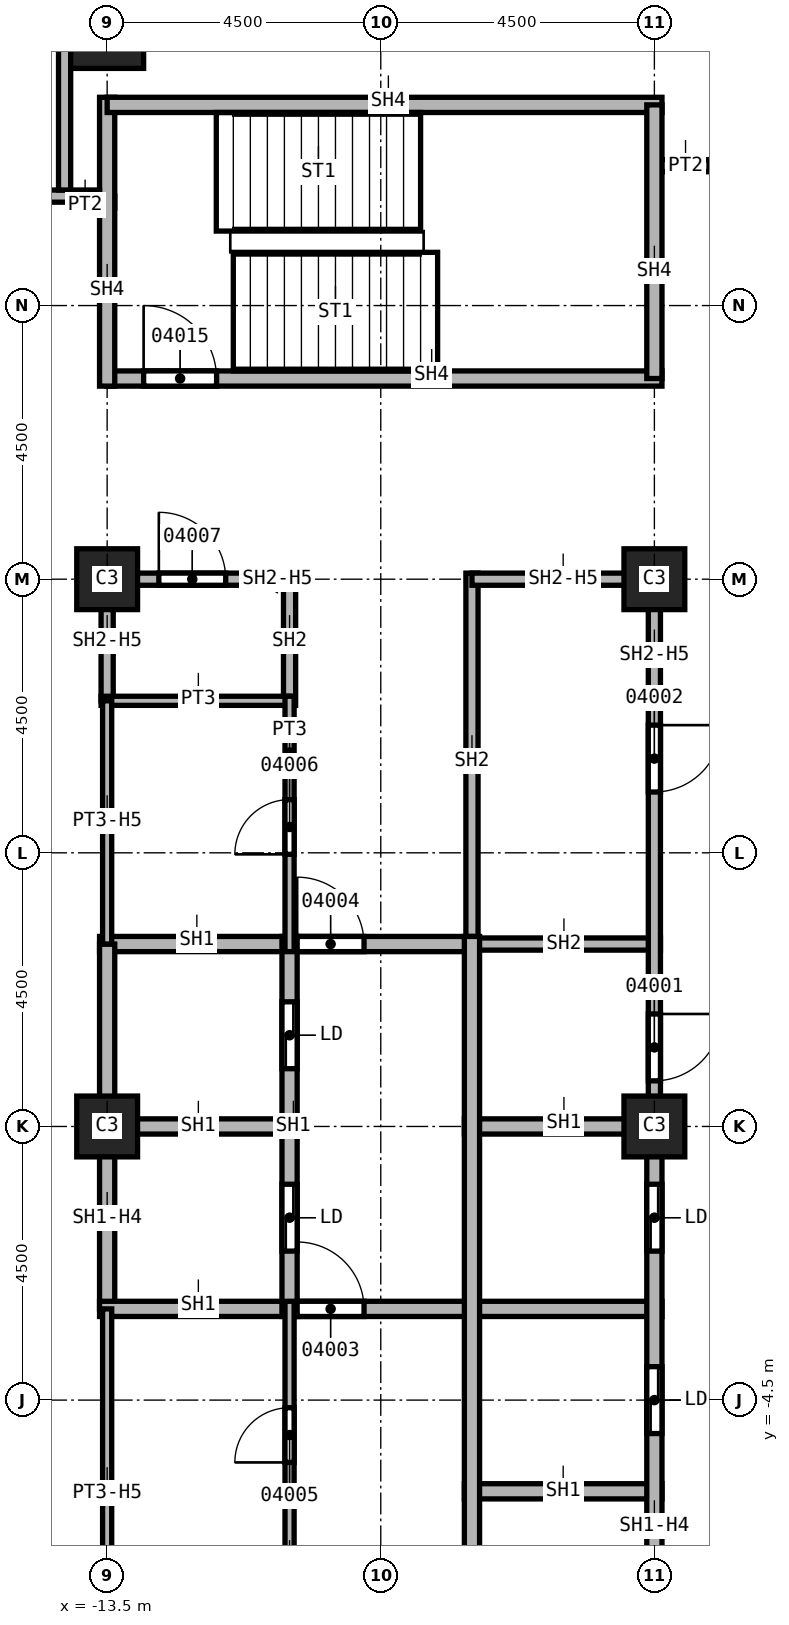
"""IFC4 building model, lengths in metres.
Left out: names, types, materials, properties, quantities, classifications, styles, units other than length and angle.
Written with IfcOpenShell. Run it as: python <this file> out.ifc"""

import sys

from ifc_helpers import new_model, si_unit, direction, frame, frame_2d, origin, origin_2d, place, context, subcontext, project, spatial, rectangle, extrude, element, fill, save


model = new_model("IFC4")
c1 = context("Model", 3, precision=1e-05, world=origin(), true_north=direction((0.0, 1.0)))
c2 = subcontext(c1, "Body", "Model", "MODEL_VIEW")
j1 = project(units=[si_unit("LENGTHUNIT", "METRE"), si_unit("PLANEANGLEUNIT", "RADIAN")], contexts=[c1])
p1 = place(None, origin())
s1 = spatial("IfcSite", under=j1, at=p1, CompositionType="ELEMENT")
p2 = place(p1, origin())
s2 = spatial("IfcBuilding", under=s1, at=p2, CompositionType="ELEMENT")
p3 = place(p2, frame((0.0, 0.0, 104.0)))
s3 = spatial("IfcBuildingStorey", under=s2, at=p3, CompositionType="ELEMENT", Elevation=104.0)
p4 = place(p3, frame((-13.5, 18.0, 0.0), z_axis=(0.0, 0.0, 1.0), x_axis=(1.0, 0.0, 0.0)))
e1 = element("IfcColumn", 1, at=p4, inside=s3, PredefinedType="COLUMN", context=c2, shape_type="SweptSolid", body=[
    extrude(rectangle(XDim=1.2, YDim=1.2, at=origin_2d()), origin(), (0.0, 0.0, 1.0), 3.7),
])
for number, where, z_axis, x_axis in (
    (2, (-4.5, 0.0, 0.0), (0.0, 0.0, 1.0), (1.0, 0.0, 0.0)),
    (3, (-4.5, 9.0, 0.0), (0.0, 0.0, 1.0), (1.0, 0.0, 0.0)),
    (4, (-13.5, 0.0, 0.0), (0.0, 0.0, 1.0), (1.0, 0.0, 0.0)),
    (5, (-13.5, 9.0, 0.0), (0.0, 0.0, 1.0), (1.0, 0.0, 0.0)),
):
    element("IfcColumn", number, at=place(p3, frame(where, z_axis=z_axis, x_axis=x_axis)), inside=s3, PredefinedType="COLUMN", context=c2, shape_type="SweptSolid", body=[
        extrude(rectangle(XDim=1.0, YDim=1.0, at=origin_2d()), origin(), (0.0, 0.0, 1.0), 3.7),
    ])
p5 = place(p3, frame((-14.1, 15.2, 0.0), z_axis=(0.0, 0.0, 1.0), x_axis=(1.0, 0.0, 0.0)))
e6 = element("IfcWall", 6, at=p5, inside=s3, PredefinedType="PARTITIONING", context=c2, shape_type="SweptSolid", body=[
    extrude(rectangle(XDim=0.725, YDim=0.2, at=frame_2d((0.363, 0.0))), origin(), (0.0, 0.0, 1.0), 3.7),
])
p6 = place(p3, frame((-4.5, 15.8, 0.0), z_axis=(0.0, 0.0, 1.0), x_axis=(1.0, 0.0, 0.0)))
e7 = element("IfcWall", 7, at=p6, inside=s3, PredefinedType="PARTITIONING", context=c2, shape_type="SweptSolid", body=[
    extrude(rectangle(XDim=0.9, YDim=0.2, at=frame_2d((0.45, 0.0))), origin(), (0.0, 0.0, 1.0), 3.7),
])
p7 = place(p3, frame((-13.5, 7.0, 0.0), z_axis=(0.0, 0.0, 1.0), x_axis=(0.0, 1.0, 0.0)))
e8 = element("IfcWall", 8, at=p7, inside=s3, PredefinedType="SOLIDWALL", context=c2, shape_type="SweptSolid", body=[
    extrude(rectangle(XDim=2.1, YDim=0.2, at=frame_2d((1.05, 0.0))), origin(), (0.0, 0.0, 1.0), 2.938),
])
p8 = place(p3, frame((-13.5, 9.0, 0.0), z_axis=(0.0, 0.0, 1.0), x_axis=(1.0, 0.0, 0.0)))
e9 = element("IfcWall", 9, at=p8, inside=s3, PredefinedType="SOLIDWALL", context=c2, shape_type="SweptSolid", body=[
    extrude(rectangle(XDim=3.0, YDim=0.2, at=frame_2d((1.5, 0.0))), origin(), (0.0, 0.0, 1.0), 2.938),
])
p9 = place(p8, frame((0.85, 0.0, 0.0)))
e10 = element("IfcOpeningElement", 10, at=p9, cuts=e9, PredefinedType="OPENING", context=c2, shape_type="SweptSolid", body=[
    extrude(rectangle(XDim=1.1, YDim=2.1, at=frame_2d((0.55, 1.05))), frame((0.0, 0.1, 0.0), z_axis=(0.0, -1.0, 0.0), x_axis=(1.0, 0.0, 0.0)), (0.0, 0.0, 1.0), 0.2),
])
p10 = place(p3, frame((-10.5, 6.925, 0.0), z_axis=(0.0, 0.0, 1.0), x_axis=(0.0, 1.0, 0.0)))
e11 = element("IfcWall", 11, at=p10, inside=s3, PredefinedType="SOLIDWALL", context=c2, shape_type="SweptSolid", body=[
    extrude(rectangle(XDim=2.175, YDim=0.2, at=frame_2d((1.087, 0.0))), origin(), (0.0, 0.0, 1.0), 3.7),
])
p11 = place(p3, frame((-7.625, 3.0, 0.0), z_axis=(0.0, 0.0, 1.0), x_axis=(1.0, 0.0, 0.0)))
e12 = element("IfcWall", 12, at=p11, inside=s3, PredefinedType="SOLIDWALL", context=c2, shape_type="SweptSolid", body=[
    extrude(rectangle(XDim=3.225, YDim=0.2, at=frame_2d((1.613, 0.0))), origin(), (0.0, 0.0, 1.0), 3.7),
])
p12 = place(p3, frame((-7.5, 2.875, 0.0), z_axis=(0.0, 0.0, 1.0), x_axis=(0.0, 1.0, 0.0)))
e13 = element("IfcWall", 13, at=p12, inside=s3, PredefinedType="SOLIDWALL", context=c2, shape_type="SweptSolid", body=[
    extrude(rectangle(XDim=6.225, YDim=0.2, at=frame_2d((3.113, 0.0))), origin(), (0.0, 0.0, 1.0), 3.7),
])
p13 = place(p3, frame((-7.5, 9.0, 0.0), z_axis=(0.0, 0.0, 1.0), x_axis=(1.0, 0.0, 0.0)))
e14 = element("IfcWall", 14, at=p13, inside=s3, PredefinedType="SOLIDWALL", context=c2, shape_type="SweptSolid", body=[
    extrude(rectangle(XDim=3.0, YDim=0.2, at=frame_2d((1.5, 0.0))), origin(), (0.0, 0.0, 1.0), 2.938),
])
p14 = place(p3, frame((-4.5, 9.1, 0.0), z_axis=(0.0, 0.0, 1.0), x_axis=(0.0, -1.0, 0.0)))
e15 = element("IfcWall", 15, at=p14, inside=s3, PredefinedType="SOLIDWALL", context=c2, shape_type="SweptSolid", body=[
    extrude(rectangle(XDim=9.1, YDim=0.2, at=frame_2d((4.55, 0.0))), origin(), (0.0, 0.0, 1.0), 2.938),
])
p15 = place(p14, frame((7.25, 0.0, 0.0)))
e16 = element("IfcOpeningElement", 16, at=p15, cuts=e15, PredefinedType="OPENING", context=c2, shape_type="SweptSolid", body=[
    extrude(rectangle(XDim=1.1, YDim=2.1, at=frame_2d((0.55, 1.05))), frame((0.0, 0.1, 0.0), z_axis=(0.0, -1.0, 0.0), x_axis=(1.0, 0.0, 0.0)), (0.0, 0.0, 1.0), 0.2),
])
p16 = place(p14, frame((2.5, 0.0, 0.0)))
e17 = element("IfcOpeningElement", 17, at=p16, cuts=e15, PredefinedType="OPENING", context=c2, shape_type="SweptSolid", body=[
    extrude(rectangle(XDim=1.1, YDim=2.1, at=frame_2d((0.55, 1.05))), frame((0.0, 0.1, 0.0), z_axis=(0.0, -1.0, 0.0), x_axis=(1.0, 0.0, 0.0)), (0.0, 0.0, 1.0), 0.2),
])
p17 = place(p3, frame((-13.625, 0.0, 0.0), z_axis=(0.0, 0.0, 1.0), x_axis=(1.0, 0.0, 0.0)))
e18 = element("IfcWall", 18, at=p17, inside=s3, PredefinedType="SOLIDWALL", context=c2, shape_type="SweptSolid", body=[
    extrude(rectangle(XDim=3.125, YDim=0.25, at=frame_2d((1.562, 0.0))), origin(), (0.0, 0.0, 1.0), 3.7),
])
p18 = place(p3, frame((-13.625, 3.0, 0.0), z_axis=(0.0, 0.0, 1.0), x_axis=(1.0, 0.0, 0.0)))
e19 = element("IfcWall", 19, at=p18, inside=s3, PredefinedType="SOLIDWALL", context=c2, shape_type="SweptSolid", body=[
    extrude(rectangle(XDim=6.125, YDim=0.25, at=frame_2d((3.062, 0.0))), origin(), (0.0, 0.0, 1.0), 3.7),
])
p19 = place(p18, frame((3.25, 0.0, 0.0)))
e20 = element("IfcOpeningElement", 20, at=p19, cuts=e19, PredefinedType="OPENING", context=c2, shape_type="SweptSolid", body=[
    extrude(rectangle(XDim=1.1, YDim=2.1, at=frame_2d((0.55, 1.05))), frame((0.0, 0.125, 0.0), z_axis=(0.0, -1.0, 0.0), x_axis=(1.0, 0.0, 0.0)), (0.0, 0.0, 1.0), 0.25),
])
p20 = place(p3, frame((-13.5, -3.0, 0.0), z_axis=(0.0, 0.0, 1.0), x_axis=(0.0, 1.0, 0.0)))
e21 = element("IfcWall", 21, at=p20, inside=s3, PredefinedType="SOLIDWALL", context=c2, shape_type="SweptSolid", body=[
    extrude(rectangle(XDim=6.0, YDim=0.25, at=frame_2d((3.0, 0.0))), origin(), (0.0, 0.0, 1.0), 2.938),
])
p21 = place(p3, frame((-13.625, -3.0, 0.0), z_axis=(0.0, 0.0, 1.0), x_axis=(1.0, 0.0, 0.0)))
e22 = element("IfcWall", 22, at=p21, inside=s3, PredefinedType="SOLIDWALL", context=c2, shape_type="SweptSolid", body=[
    extrude(rectangle(XDim=9.25, YDim=0.25, at=frame_2d((4.625, 0.0))), origin(), (0.0, 0.0, 1.0), 3.7),
])
p22 = place(p21, frame((3.25, 0.0, 0.0)))
e23 = element("IfcOpeningElement", 23, at=p22, cuts=e22, PredefinedType="OPENING", context=c2, shape_type="SweptSolid", body=[
    extrude(rectangle(XDim=1.1, YDim=2.1, at=frame_2d((0.55, 1.05))), frame((0.0, 0.125, 0.0), z_axis=(0.0, -1.0, 0.0), x_axis=(1.0, 0.0, 0.0)), (0.0, 0.0, 1.0), 0.25),
])
p23 = place(p3, frame((-10.5, -3.125, 0.0), z_axis=(0.0, 0.0, 1.0), x_axis=(0.0, 1.0, 0.0)))
e24 = element("IfcWall", 24, at=p23, inside=s3, PredefinedType="SOLIDWALL", context=c2, shape_type="SweptSolid", body=[
    extrude(rectangle(XDim=6.25, YDim=0.25, at=frame_2d((3.125, 0.0))), origin(), (0.0, 0.0, 1.0), 3.7),
])
p24 = place(p23, frame((1.075, 0.0, 0.0)))
e25 = element("IfcOpeningElement", 25, at=p24, cuts=e24, PredefinedType="OPENING", context=c2, shape_type="SweptSolid", body=[
    extrude(rectangle(XDim=1.1, YDim=2.1, at=frame_2d((0.55, 1.05))), frame((0.0, 0.125, 0.0), z_axis=(0.0, -1.0, 0.0), x_axis=(1.0, 0.0, 0.0)), (0.0, 0.0, 1.0), 0.25),
])
p25 = place(p23, frame((4.075, 0.0, 0.0)))
e26 = element("IfcOpeningElement", 26, at=p25, cuts=e24, PredefinedType="OPENING", context=c2, shape_type="SweptSolid", body=[
    extrude(rectangle(XDim=1.1, YDim=2.1, at=frame_2d((0.55, 1.05))), frame((0.0, 0.125, 0.0), z_axis=(0.0, -1.0, 0.0), x_axis=(1.0, 0.0, 0.0)), (0.0, 0.0, 1.0), 0.25),
])
for number, where, z_axis, x_axis in (
    (27, (-7.625, -6.0, 0.0), (0.0, 0.0, 1.0), (1.0, 0.0, 0.0)),
    (28, (-7.625, 0.0, 0.0), (0.0, 0.0, 1.0), (1.0, 0.0, 0.0)),
):
    element("IfcWall", number, at=place(p3, frame(where, z_axis=z_axis, x_axis=x_axis)), inside=s3, PredefinedType="SOLIDWALL", context=c2, shape_type="SweptSolid", body=[
        extrude(rectangle(XDim=3.25, YDim=0.25, at=frame_2d((1.625, 0.0))), origin(), (0.0, 0.0, 1.0), 3.7),
    ])
p26 = place(p3, frame((-7.5, -9.125, 0.0), z_axis=(0.0, 0.0, 1.0), x_axis=(0.0, 1.0, 0.0)))
e29 = element("IfcWall", 29, at=p26, inside=s3, PredefinedType="SOLIDWALL", context=c2, shape_type="SweptSolid", body=[
    extrude(rectangle(XDim=12.25, YDim=0.25, at=frame_2d((6.125, 0.0))), origin(), (0.0, 0.0, 1.0), 3.7),
])
p27 = place(p3, frame((-4.5, 0.0, 0.0), z_axis=(0.0, 0.0, 1.0), x_axis=(0.0, -1.0, 0.0)))
e30 = element("IfcWall", 30, at=p27, inside=s3, PredefinedType="SOLIDWALL", context=c2, shape_type="SweptSolid", body=[
    extrude(rectangle(XDim=9.125, YDim=0.25, at=frame_2d((4.562, 0.0))), origin(), (0.0, 0.0, 1.0), 2.938),
])
p28 = place(p27, frame((7.012, 0.0, 0.0)))
e31 = element("IfcOpeningElement", 31, at=p28, cuts=e30, PredefinedType="OPENING", context=c2, shape_type="SweptSolid", body=[
    extrude(rectangle(XDim=1.1, YDim=2.1, at=frame_2d((0.55, 1.05))), frame((0.0, 0.125, 0.0), z_axis=(0.0, -1.0, 0.0), x_axis=(1.0, 0.0, 0.0)), (0.0, 0.0, 1.0), 0.25),
])
p29 = place(p27, frame((3.95, 0.0, 0.0)))
e32 = element("IfcOpeningElement", 32, at=p29, cuts=e30, PredefinedType="OPENING", context=c2, shape_type="SweptSolid", body=[
    extrude(rectangle(XDim=1.1, YDim=2.1, at=frame_2d((0.55, 1.05))), frame((0.0, 0.125, 0.0), z_axis=(0.0, -1.0, 0.0), x_axis=(1.0, 0.0, 0.0)), (0.0, 0.0, 1.0), 0.25),
])
p30 = place(p27, frame((0.95, 0.0, 0.0)))
e33 = element("IfcOpeningElement", 33, at=p30, cuts=e30, PredefinedType="OPENING", context=c2, shape_type="SweptSolid", body=[
    extrude(rectangle(XDim=1.1, YDim=2.1, at=frame_2d((0.55, 1.05))), frame((0.0, 0.125, 0.0), z_axis=(0.0, -1.0, 0.0), x_axis=(1.0, 0.0, 0.0)), (0.0, 0.0, 1.0), 0.25),
])
p31 = place(p3, frame((-13.5, 12.3, 0.0), z_axis=(0.0, 0.0, 1.0), x_axis=(1.0, 0.0, 0.0)))
e34 = element("IfcWall", 34, at=p31, inside=s3, PredefinedType="SOLIDWALL", context=c2, shape_type="SweptSolid", body=[
    extrude(rectangle(XDim=9.125, YDim=0.25, at=frame_2d((4.562, 0.0))), origin(), (0.0, 0.0, 1.0), 3.7),
])
p32 = place(p31, frame((0.6, 0.0, 0.0)))
e35 = element("IfcOpeningElement", 35, at=p32, cuts=e34, PredefinedType="OPENING", context=c2, shape_type="SweptSolid", body=[
    extrude(rectangle(XDim=1.2, YDim=2.1, at=frame_2d((0.6, 1.05))), frame((0.0, 0.125, 0.0), z_axis=(0.0, -1.0, 0.0), x_axis=(1.0, 0.0, 0.0)), (0.0, 0.0, 1.0), 0.25),
])
p33 = place(p3, frame((-13.5, 12.175, 0.0), z_axis=(0.0, 0.0, 1.0), x_axis=(0.0, 1.0, 0.0)))
e36 = element("IfcWall", 36, at=p33, inside=s3, PredefinedType="SOLIDWALL", context=c2, shape_type="SweptSolid", body=[
    extrude(rectangle(XDim=4.75, YDim=0.25, at=frame_2d((2.375, 0.0))), origin(), (0.0, 0.0, 1.0), 3.7),
])
p34 = place(p3, frame((-13.5, 16.8, 0.0), z_axis=(0.0, 0.0, 1.0), x_axis=(1.0, 0.0, 0.0)))
e37 = element("IfcWall", 37, at=p34, inside=s3, PredefinedType="SOLIDWALL", context=c2, shape_type="SweptSolid", body=[
    extrude(rectangle(XDim=9.125, YDim=0.25, at=frame_2d((4.562, 0.0))), origin(), (0.0, 0.0, 1.0), 3.7),
])
p35 = place(p3, frame((-4.5, 16.8, 0.0), z_axis=(0.0, 0.0, 1.0), x_axis=(0.0, -1.0, 0.0)))
e38 = element("IfcWall", 38, at=p35, inside=s3, PredefinedType="SOLIDWALL", context=c2, shape_type="SweptSolid", body=[
    extrude(rectangle(XDim=4.5, YDim=0.25, at=frame_2d((2.25, 0.0))), origin(), (0.0, 0.0, 1.0), 3.7),
])
p36 = place(p3, frame((-13.6, 7.0, 0.0), z_axis=(0.0, 0.0, 1.0), x_axis=(1.0, 0.0, 0.0)))
e39 = element("IfcWall", 39, at=p36, inside=s3, PredefinedType="PARTITIONING", context=c2, shape_type="SweptSolid", body=[
    extrude(rectangle(XDim=3.1, YDim=0.15, at=frame_2d((1.55, 0.0))), origin(), (0.0, 0.0, 1.0), 3.7),
])
p37 = place(p3, frame((-13.5, -9.075, 0.0), z_axis=(0.0, 0.0, 1.0), x_axis=(0.0, 1.0, 0.0)))
e40 = element("IfcWall", 40, at=p37, inside=s3, PredefinedType="PARTITIONING", context=c2, shape_type="SweptSolid", body=[
    extrude(rectangle(XDim=6.075, YDim=0.15, at=frame_2d((3.038, 0.0))), origin(), (0.0, 0.0, 1.0), 2.938),
])
p38 = place(p3, frame((-13.5, 3.0, 0.0), z_axis=(0.0, 0.0, 1.0), x_axis=(0.0, 1.0, 0.0)))
e41 = element("IfcWall", 41, at=p38, inside=s3, PredefinedType="PARTITIONING", context=c2, shape_type="SweptSolid", body=[
    extrude(rectangle(XDim=4.0, YDim=0.15, at=frame_2d((2.0, 0.0))), origin(), (0.0, 0.0, 1.0), 2.938),
])
p39 = place(p3, frame((-10.5, -9.075, 0.0), z_axis=(0.0, 0.0, 1.0), x_axis=(0.0, 1.0, 0.0)))
e42 = element("IfcWall", 42, at=p39, inside=s3, PredefinedType="PARTITIONING", context=c2, shape_type="SweptSolid", body=[
    extrude(rectangle(XDim=6.2, YDim=0.15, at=frame_2d((3.1, 0.0))), origin(), (0.0, 0.0, 1.0), 3.7),
])
p40 = place(p39, frame((3.55, 0.0, 0.0)))
e43 = element("IfcOpeningElement", 43, at=p40, cuts=e42, PredefinedType="OPENING", context=c2, shape_type="SweptSolid", body=[
    extrude(rectangle(XDim=0.9, YDim=2.1, at=frame_2d((0.45, 1.05))), frame((0.0, 0.075, 0.0), z_axis=(0.0, -1.0, 0.0), x_axis=(1.0, 0.0, 0.0)), (0.0, 0.0, 1.0), 0.15),
])
p41 = place(p3, frame((-10.5, 2.875, 0.0), z_axis=(0.0, 0.0, 1.0), x_axis=(0.0, 1.0, 0.0)))
e44 = element("IfcWall", 44, at=p41, inside=s3, PredefinedType="PARTITIONING", context=c2, shape_type="SweptSolid", body=[
    extrude(rectangle(XDim=4.2, YDim=0.15, at=frame_2d((2.1, 0.0))), origin(), (0.0, 0.0, 1.0), 3.7),
])
p42 = place(p41, frame((1.6, 0.0, 0.0)))
e45 = element("IfcOpeningElement", 45, at=p42, cuts=e44, PredefinedType="OPENING", context=c2, shape_type="SweptSolid", body=[
    extrude(rectangle(XDim=0.9, YDim=2.1, at=frame_2d((0.45, 1.05))), frame((0.0, 0.075, 0.0), z_axis=(0.0, -1.0, 0.0), x_axis=(1.0, 0.0, 0.0)), (0.0, 0.0, 1.0), 0.15),
])
p43 = place(p3, frame((-21.9, 15.3, 0.0), z_axis=(0.0, 0.0, 1.0), x_axis=(1.0, 0.0, 0.0)))
e46 = element("IfcWall", 46, at=p43, inside=s3, PredefinedType="SOLIDWALL", context=c2, shape_type="SweptSolid", body=[
    extrude(rectangle(XDim=8.275, YDim=0.2, at=frame_2d((4.137, 0.0))), origin(), (0.0, 0.0, 1.0), 3.7),
])
p44 = place(p43, frame((4.8, 0.0, 0.0)))
e47 = element("IfcOpeningElement", 47, at=p44, cuts=e46, PredefinedType="OPENING", context=c2, shape_type="SweptSolid", body=[
    extrude(rectangle(XDim=1.2, YDim=2.1, at=frame_2d((0.6, 1.05))), frame((0.0, 0.1, 0.0), z_axis=(0.0, -1.0, 0.0), x_axis=(1.0, 0.0, 0.0)), (0.0, 0.0, 1.0), 0.2),
])
p45 = place(p3, frame((-14.2, 15.4, 0.0), z_axis=(0.0, 0.0, 1.0), x_axis=(0.0, 1.0, 0.0)))
e48 = element("IfcWall", 48, at=p45, inside=s3, PredefinedType="SOLIDWALL", context=c2, shape_type="SweptSolid", body=[
    extrude(rectangle(XDim=5.9, YDim=0.2, at=frame_2d((2.95, 0.0))), origin(), (0.0, 0.0, 1.0), 3.7),
])
p46 = place(p15, origin())
e49 = element("IfcDoor", 49, at=p46, inside=s3, OperationType="SINGLE_SWING_RIGHT", PredefinedType="DOOR", context=c2, shape_type="SweptSolid", body=[
    extrude(rectangle(XDim=1.1, YDim=2.1, at=frame_2d((0.55, 1.05))), frame((0.0, 0.025, 0.0), z_axis=(0.0, -1.0, 0.0), x_axis=(1.0, 0.0, 0.0)), (0.0, 0.0, 1.0), 0.05),
])
fill(e16, e49)
p47 = place(p16, origin())
e50 = element("IfcDoor", 50, at=p47, inside=s3, OperationType="SINGLE_SWING_LEFT", PredefinedType="DOOR", context=c2, shape_type="SweptSolid", body=[
    extrude(rectangle(XDim=1.1, YDim=2.1, at=frame_2d((0.55, 1.05))), frame((0.0, 0.025, 0.0), z_axis=(0.0, -1.0, 0.0), x_axis=(1.0, 0.0, 0.0)), (0.0, 0.0, 1.0), 0.05),
])
fill(e17, e50)
p48 = place(p22, origin())
e51 = element("IfcDoor", 51, at=p48, inside=s3, OperationType="SINGLE_SWING_RIGHT", PredefinedType="DOOR", context=c2, shape_type="SweptSolid", body=[
    extrude(rectangle(XDim=1.1, YDim=2.1, at=frame_2d((0.55, 1.05))), frame((0.0, 0.025, 0.0), z_axis=(0.0, -1.0, 0.0), x_axis=(1.0, 0.0, 0.0)), (0.0, 0.0, 1.0), 0.05),
])
fill(e23, e51)
p49 = place(p19, origin())
e52 = element("IfcDoor", 52, at=p49, inside=s3, OperationType="SINGLE_SWING_LEFT", PredefinedType="DOOR", context=c2, shape_type="SweptSolid", body=[
    extrude(rectangle(XDim=1.1, YDim=2.1, at=frame_2d((0.55, 1.05))), frame((0.0, 0.025, 0.0), z_axis=(0.0, -1.0, 0.0), x_axis=(1.0, 0.0, 0.0)), (0.0, 0.0, 1.0), 0.05),
])
fill(e20, e52)
p50 = place(p40, origin())
e53 = element("IfcDoor", 53, at=p50, inside=s3, OperationType="SINGLE_SWING_RIGHT", PredefinedType="DOOR", context=c2, shape_type="SweptSolid", body=[
    extrude(rectangle(XDim=0.9, YDim=2.1, at=frame_2d((0.45, 1.05))), frame((0.0, 0.025, 0.0), z_axis=(0.0, -1.0, 0.0), x_axis=(1.0, 0.0, 0.0)), (0.0, 0.0, 1.0), 0.05),
])
fill(e43, e53)
p51 = place(p42, origin())
e54 = element("IfcDoor", 54, at=p51, inside=s3, OperationType="SINGLE_SWING_LEFT", PredefinedType="DOOR", context=c2, shape_type="SweptSolid", body=[
    extrude(rectangle(XDim=0.9, YDim=2.1, at=frame_2d((0.45, 1.05))), frame((0.0, 0.025, 0.0), z_axis=(0.0, -1.0, 0.0), x_axis=(1.0, 0.0, 0.0)), (0.0, 0.0, 1.0), 0.05),
])
fill(e45, e54)
p52 = place(p9, origin())
e55 = element("IfcDoor", 55, at=p52, inside=s3, OperationType="SINGLE_SWING_RIGHT", PredefinedType="DOOR", context=c2, shape_type="SweptSolid", body=[
    extrude(rectangle(XDim=1.1, YDim=2.1, at=frame_2d((0.55, 1.05))), frame((0.0, 0.025, 0.0), z_axis=(0.0, -1.0, 0.0), x_axis=(1.0, 0.0, 0.0)), (0.0, 0.0, 1.0), 0.05),
])
fill(e10, e55)
p53 = place(p32, origin())
e56 = element("IfcDoor", 56, at=p53, inside=s3, OperationType="SINGLE_SWING_RIGHT", PredefinedType="DOOR", context=c2, shape_type="SweptSolid", body=[
    extrude(rectangle(XDim=1.2, YDim=2.1, at=frame_2d((0.6, 1.05))), frame((0.0, 0.025, 0.0), z_axis=(0.0, -1.0, 0.0), x_axis=(1.0, 0.0, 0.0)), (0.0, 0.0, 1.0), 0.05),
])
fill(e35, e56)
p54 = place(p29, origin())
e57 = element("IfcDoor", 57, at=p54, inside=s3, OperationType="SLIDING_TO_LEFT", PredefinedType="DOOR", context=c2, shape_type="SweptSolid", body=[
    extrude(rectangle(XDim=1.1, YDim=2.1, at=frame_2d((0.55, 1.05))), frame((0.0, 0.025, 0.0), z_axis=(0.0, -1.0, 0.0), x_axis=(1.0, 0.0, 0.0)), (0.0, 0.0, 1.0), 0.05),
])
fill(e32, e57)
p55 = place(p30, origin())
e58 = element("IfcDoor", 58, at=p55, inside=s3, OperationType="SLIDING_TO_LEFT", PredefinedType="DOOR", context=c2, shape_type="SweptSolid", body=[
    extrude(rectangle(XDim=1.1, YDim=2.1, at=frame_2d((0.55, 1.05))), frame((0.0, 0.025, 0.0), z_axis=(0.0, -1.0, 0.0), x_axis=(1.0, 0.0, 0.0)), (0.0, 0.0, 1.0), 0.05),
])
fill(e33, e58)
p56 = place(p24, origin())
e59 = element("IfcDoor", 59, at=p56, inside=s3, OperationType="SLIDING_TO_LEFT", PredefinedType="DOOR", context=c2, shape_type="SweptSolid", body=[
    extrude(rectangle(XDim=1.1, YDim=2.1, at=frame_2d((0.55, 1.05))), frame((0.0, 0.025, 0.0), z_axis=(0.0, -1.0, 0.0), x_axis=(1.0, 0.0, 0.0)), (0.0, 0.0, 1.0), 0.05),
])
fill(e25, e59)
p57 = place(p25, origin())
e60 = element("IfcDoor", 60, at=p57, inside=s3, OperationType="SLIDING_TO_LEFT", PredefinedType="DOOR", context=c2, shape_type="SweptSolid", body=[
    extrude(rectangle(XDim=1.1, YDim=2.1, at=frame_2d((0.55, 1.05))), frame((0.0, 0.025, 0.0), z_axis=(0.0, -1.0, 0.0), x_axis=(1.0, 0.0, 0.0)), (0.0, 0.0, 1.0), 0.05),
])
fill(e26, e60)
save(model, sys.argv[1])
